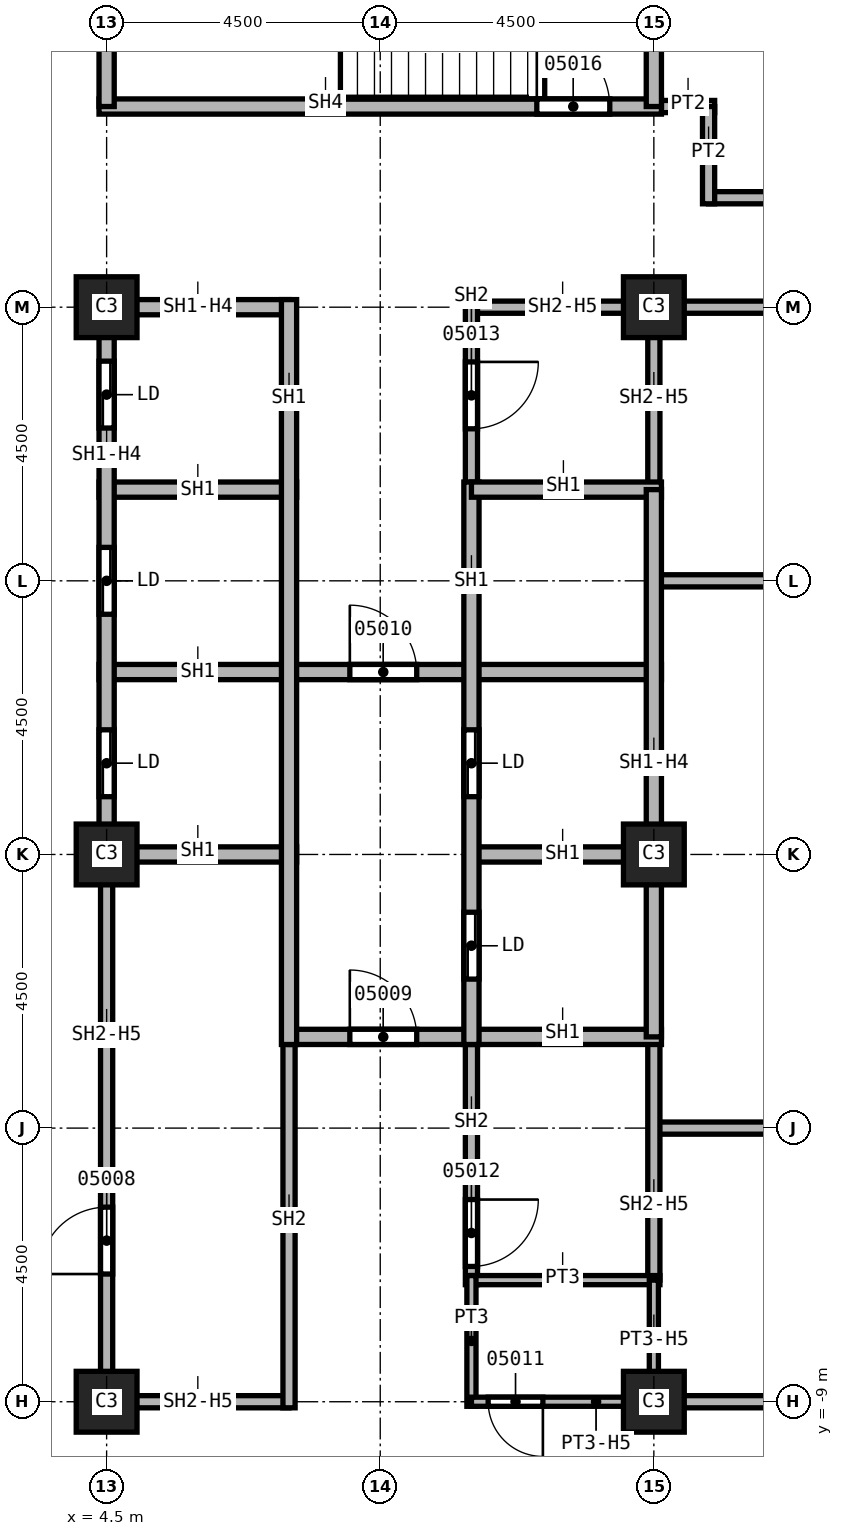
"""IFC4 building model, lengths in metres.
Left out: names, types, materials, properties, quantities, classifications, styles, units other than length and angle.
Written with IfcOpenShell. Run it as: python <this file> out.ifc"""

import sys

from ifc_helpers import new_model, si_unit, direction, frame, frame_2d, origin, origin_2d, place, context, subcontext, project, spatial, rectangle, extrude, element, fill, save


model = new_model("IFC4")
c1 = context("Model", 3, precision=1e-05, world=origin(), true_north=direction((0.0, 1.0)))
c2 = subcontext(c1, "Body", "Model", "MODEL_VIEW")
j1 = project(units=[si_unit("LENGTHUNIT", "METRE"), si_unit("PLANEANGLEUNIT", "RADIAN")], contexts=[c1])
p1 = place(None, origin())
s1 = spatial("IfcSite", under=j1, at=p1, CompositionType="ELEMENT")
p2 = place(p1, origin())
s2 = spatial("IfcBuilding", under=s1, at=p2, CompositionType="ELEMENT")
p3 = place(p2, frame((0.0, 0.0, 112.0)))
s3 = spatial("IfcBuildingStorey", under=s2, at=p3, CompositionType="ELEMENT", Elevation=112.0)
for number, where, z_axis, x_axis in (
    (1, (4.5, 0.0, 0.0), (0.0, 0.0, 1.0), (1.0, 0.0, 0.0)),
    (2, (4.5, 9.0, 0.0), (0.0, 0.0, 1.0), (1.0, 0.0, 0.0)),
    (3, (4.5, -9.0, 0.0), (0.0, 0.0, 1.0), (1.0, 0.0, 0.0)),
    (4, (13.5, 0.0, 0.0), (0.0, 0.0, 1.0), (1.0, 0.0, 0.0)),
    (5, (13.5, 9.0, 0.0), (0.0, 0.0, 1.0), (1.0, 0.0, 0.0)),
    (6, (13.5, -9.0, 0.0), (0.0, 0.0, 1.0), (1.0, 0.0, 0.0)),
):
    element("IfcColumn", number, at=place(p3, frame(where, z_axis=z_axis, x_axis=x_axis)), inside=s3, PredefinedType="COLUMN", context=c2, shape_type="SweptSolid", body=[
        extrude(rectangle(XDim=1.0, YDim=1.0, at=origin_2d()), origin(), (0.0, 0.0, 1.0), 3.7),
    ])
p4 = place(p3, frame((13.375, 12.3, 0.0), z_axis=(0.0, 0.0, 1.0), x_axis=(1.0, 0.0, 0.0)))
e7 = element("IfcWall", 7, at=p4, inside=s3, PredefinedType="PARTITIONING", context=c2, shape_type="SweptSolid", body=[
    extrude(rectangle(XDim=1.125, YDim=0.2, at=frame_2d((0.562, 0.0))), origin(), (0.0, 0.0, 1.0), 3.7),
])
for number, where, z_axis, x_axis in (
    (8, (13.5, -9.0, 0.0), (0.0, 0.0, 1.0), (1.0, 0.0, 0.0)),
    (9, (13.5, -4.5, 0.0), (0.0, 0.0, 1.0), (1.0, 0.0, 0.0)),
    (10, (13.5, 4.5, 0.0), (0.0, 0.0, 1.0), (1.0, 0.0, 0.0)),
    (11, (18.0, 9.0, 0.0), (0.0, 0.0, 1.0), (-1.0, 0.0, 0.0)),
):
    element("IfcWall", number, at=place(p3, frame(where, z_axis=z_axis, x_axis=x_axis)), inside=s3, PredefinedType="PARTITIONING", context=c2, shape_type="SweptSolid", body=[
        extrude(rectangle(XDim=4.5, YDim=0.2, at=frame_2d((2.25, 0.0))), origin(), (0.0, 0.0, 1.0), 3.7),
    ])
p5 = place(p3, frame((14.4, 10.8, 0.0), z_axis=(0.0, 0.0, 1.0), x_axis=(1.0, 0.0, 0.0)))
e12 = element("IfcWall", 12, at=p5, inside=s3, PredefinedType="PARTITIONING", context=c2, shape_type="SweptSolid", body=[
    extrude(rectangle(XDim=3.6, YDim=0.2, at=frame_2d((1.8, 0.0))), origin(), (0.0, 0.0, 1.0), 3.7),
])
p6 = place(p3, frame((14.4, 12.3, 0.0), z_axis=(0.0, 0.0, 1.0), x_axis=(0.0, -1.0, 0.0)))
e13 = element("IfcWall", 13, at=p6, inside=s3, PredefinedType="PARTITIONING", context=c2, shape_type="SweptSolid", body=[
    extrude(rectangle(XDim=1.6, YDim=0.2, at=frame_2d((0.8, 0.0))), origin(), (0.0, 0.0, 1.0), 3.7),
])
p7 = place(p3, frame((4.5, -9.1, 0.0), z_axis=(0.0, 0.0, 1.0), x_axis=(0.0, 1.0, 0.0)))
e14 = element("IfcWall", 14, at=p7, inside=s3, PredefinedType="SOLIDWALL", context=c2, shape_type="SweptSolid", body=[
    extrude(rectangle(XDim=9.1, YDim=0.2, at=frame_2d((4.55, 0.0))), origin(), (0.0, 0.0, 1.0), 2.938),
])
p8 = place(p7, frame((2.2, 0.0, 0.0)))
e15 = element("IfcOpeningElement", 15, at=p8, cuts=e14, PredefinedType="OPENING", context=c2, shape_type="SweptSolid", body=[
    extrude(rectangle(XDim=1.1, YDim=2.1, at=frame_2d((0.55, 1.05))), frame((0.0, 0.1, 0.0), z_axis=(0.0, -1.0, 0.0), x_axis=(1.0, 0.0, 0.0)), (0.0, 0.0, 1.0), 0.2),
])
p9 = place(p3, frame((7.5, -9.0, 0.0), z_axis=(0.0, 0.0, 1.0), x_axis=(-1.0, 0.0, 0.0)))
e16 = element("IfcWall", 16, at=p9, inside=s3, PredefinedType="SOLIDWALL", context=c2, shape_type="SweptSolid", body=[
    extrude(rectangle(XDim=3.0, YDim=0.2, at=frame_2d((1.5, 0.0))), origin(), (0.0, 0.0, 1.0), 2.938),
])
p10 = place(p3, frame((7.5, -2.875, 0.0), z_axis=(0.0, 0.0, 1.0), x_axis=(0.0, -1.0, 0.0)))
e17 = element("IfcWall", 17, at=p10, inside=s3, PredefinedType="SOLIDWALL", context=c2, shape_type="SweptSolid", body=[
    extrude(rectangle(XDim=6.225, YDim=0.2, at=frame_2d((3.113, 0.0))), origin(), (0.0, 0.0, 1.0), 3.7),
])
p11 = place(p3, frame((10.5, -2.875, 0.0), z_axis=(0.0, 0.0, 1.0), x_axis=(0.0, -1.0, 0.0)))
e18 = element("IfcWall", 18, at=p11, inside=s3, PredefinedType="SOLIDWALL", context=c2, shape_type="SweptSolid", body=[
    extrude(rectangle(XDim=4.2, YDim=0.2, at=frame_2d((2.1, 0.0))), origin(), (0.0, 0.0, 1.0), 3.7),
])
p12 = place(p11, frame((2.8, 0.0, 0.0)))
e19 = element("IfcOpeningElement", 19, at=p12, cuts=e18, PredefinedType="OPENING", context=c2, shape_type="SweptSolid", body=[
    extrude(rectangle(XDim=1.1, YDim=2.1, at=frame_2d((0.55, 1.05))), frame((0.0, 0.1, 0.0), z_axis=(0.0, -1.0, 0.0), x_axis=(1.0, 0.0, 0.0)), (0.0, 0.0, 1.0), 0.2),
])
p13 = place(p3, frame((10.5, 9.0, 0.0), z_axis=(0.0, 0.0, 1.0), x_axis=(1.0, 0.0, 0.0)))
e20 = element("IfcWall", 20, at=p13, inside=s3, PredefinedType="SOLIDWALL", context=c2, shape_type="SweptSolid", body=[
    extrude(rectangle(XDim=3.1, YDim=0.2, at=frame_2d((1.55, 0.0))), origin(), (0.0, 0.0, 1.0), 2.938),
])
p14 = place(p3, frame((10.5, 9.1, 0.0), z_axis=(0.0, 0.0, 1.0), x_axis=(0.0, -1.0, 0.0)))
e21 = element("IfcWall", 21, at=p14, inside=s3, PredefinedType="SOLIDWALL", context=c2, shape_type="SweptSolid", body=[
    extrude(rectangle(XDim=3.225, YDim=0.2, at=frame_2d((1.613, 0.0))), origin(), (0.0, 0.0, 1.0), 3.7),
])
p15 = place(p14, frame((1.0, 0.0, 0.0)))
e22 = element("IfcOpeningElement", 22, at=p15, cuts=e21, PredefinedType="OPENING", context=c2, shape_type="SweptSolid", body=[
    extrude(rectangle(XDim=1.1, YDim=2.1, at=frame_2d((0.55, 1.05))), frame((0.0, 0.1, 0.0), z_axis=(0.0, -1.0, 0.0), x_axis=(1.0, 0.0, 0.0)), (0.0, 0.0, 1.0), 0.2),
])
p16 = place(p3, frame((13.5, -3.0, 0.0), z_axis=(0.0, 0.0, 1.0), x_axis=(0.0, -1.0, 0.0)))
e23 = element("IfcWall", 23, at=p16, inside=s3, PredefinedType="SOLIDWALL", context=c2, shape_type="SweptSolid", body=[
    extrude(rectangle(XDim=4.0, YDim=0.2, at=frame_2d((2.0, 0.0))), origin(), (0.0, 0.0, 1.0), 2.938),
])
p17 = place(p3, frame((13.5, 9.1, 0.0), z_axis=(0.0, 0.0, 1.0), x_axis=(0.0, -1.0, 0.0)))
e24 = element("IfcWall", 24, at=p17, inside=s3, PredefinedType="SOLIDWALL", context=c2, shape_type="SweptSolid", body=[
    extrude(rectangle(XDim=3.1, YDim=0.2, at=frame_2d((1.55, 0.0))), origin(), (0.0, 0.0, 1.0), 2.938),
])
p18 = place(p3, frame((4.375, 0.0, 0.0), z_axis=(0.0, 0.0, 1.0), x_axis=(1.0, 0.0, 0.0)))
e25 = element("IfcWall", 25, at=p18, inside=s3, PredefinedType="SOLIDWALL", context=c2, shape_type="SweptSolid", body=[
    extrude(rectangle(XDim=3.25, YDim=0.25, at=frame_2d((1.625, 0.0))), origin(), (0.0, 0.0, 1.0), 3.7),
])
p19 = place(p3, frame((4.375, 3.0, 0.0), z_axis=(0.0, 0.0, 1.0), x_axis=(1.0, 0.0, 0.0)))
e26 = element("IfcWall", 26, at=p19, inside=s3, PredefinedType="SOLIDWALL", context=c2, shape_type="SweptSolid", body=[
    extrude(rectangle(XDim=9.25, YDim=0.25, at=frame_2d((4.625, 0.0))), origin(), (0.0, 0.0, 1.0), 3.7),
])
p20 = place(p19, frame((4.125, 0.0, 0.0)))
e27 = element("IfcOpeningElement", 27, at=p20, cuts=e26, PredefinedType="OPENING", context=c2, shape_type="SweptSolid", body=[
    extrude(rectangle(XDim=1.1, YDim=2.1, at=frame_2d((0.55, 1.05))), frame((0.0, 0.125, 0.0), z_axis=(0.0, -1.0, 0.0), x_axis=(1.0, 0.0, 0.0)), (0.0, 0.0, 1.0), 0.25),
])
p21 = place(p3, frame((4.375, 6.0, 0.0), z_axis=(0.0, 0.0, 1.0), x_axis=(1.0, 0.0, 0.0)))
e28 = element("IfcWall", 28, at=p21, inside=s3, PredefinedType="SOLIDWALL", context=c2, shape_type="SweptSolid", body=[
    extrude(rectangle(XDim=3.25, YDim=0.25, at=frame_2d((1.625, 0.0))), origin(), (0.0, 0.0, 1.0), 3.7),
])
p22 = place(p3, frame((4.5, 0.0, 0.0), z_axis=(0.0, 0.0, 1.0), x_axis=(0.0, 1.0, 0.0)))
e29 = element("IfcWall", 29, at=p22, inside=s3, PredefinedType="SOLIDWALL", context=c2, shape_type="SweptSolid", body=[
    extrude(rectangle(XDim=9.125, YDim=0.25, at=frame_2d((4.562, 0.0))), origin(), (0.0, 0.0, 1.0), 2.938),
])
p23 = place(p22, frame((0.95, 0.0, 0.0)))
e30 = element("IfcOpeningElement", 30, at=p23, cuts=e29, PredefinedType="OPENING", context=c2, shape_type="SweptSolid", body=[
    extrude(rectangle(XDim=1.1, YDim=2.1, at=frame_2d((0.55, 1.05))), frame((0.0, 0.125, 0.0), z_axis=(0.0, -1.0, 0.0), x_axis=(1.0, 0.0, 0.0)), (0.0, 0.0, 1.0), 0.25),
])
p24 = place(p22, frame((3.95, 0.0, 0.0)))
e31 = element("IfcOpeningElement", 31, at=p24, cuts=e29, PredefinedType="OPENING", context=c2, shape_type="SweptSolid", body=[
    extrude(rectangle(XDim=1.1, YDim=2.1, at=frame_2d((0.55, 1.05))), frame((0.0, 0.125, 0.0), z_axis=(0.0, -1.0, 0.0), x_axis=(1.0, 0.0, 0.0)), (0.0, 0.0, 1.0), 0.25),
])
p25 = place(p22, frame((7.012, 0.0, 0.0)))
e32 = element("IfcOpeningElement", 32, at=p25, cuts=e29, PredefinedType="OPENING", context=c2, shape_type="SweptSolid", body=[
    extrude(rectangle(XDim=1.1, YDim=2.1, at=frame_2d((0.55, 1.05))), frame((0.0, 0.125, 0.0), z_axis=(0.0, -1.0, 0.0), x_axis=(1.0, 0.0, 0.0)), (0.0, 0.0, 1.0), 0.25),
])
p26 = place(p3, frame((4.5, 9.0, 0.0), z_axis=(0.0, 0.0, 1.0), x_axis=(1.0, 0.0, 0.0)))
e33 = element("IfcWall", 33, at=p26, inside=s3, PredefinedType="SOLIDWALL", context=c2, shape_type="SweptSolid", body=[
    extrude(rectangle(XDim=3.0, YDim=0.25, at=frame_2d((1.5, 0.0))), origin(), (0.0, 0.0, 1.0), 2.938),
])
p27 = place(p3, frame((7.5, -3.0, 0.0), z_axis=(0.0, 0.0, 1.0), x_axis=(1.0, 0.0, 0.0)))
e34 = element("IfcWall", 34, at=p27, inside=s3, PredefinedType="SOLIDWALL", context=c2, shape_type="SweptSolid", body=[
    extrude(rectangle(XDim=6.125, YDim=0.25, at=frame_2d((3.062, 0.0))), origin(), (0.0, 0.0, 1.0), 3.7),
])
p28 = place(p27, frame((1.0, 0.0, 0.0)))
e35 = element("IfcOpeningElement", 35, at=p28, cuts=e34, PredefinedType="OPENING", context=c2, shape_type="SweptSolid", body=[
    extrude(rectangle(XDim=1.1, YDim=2.1, at=frame_2d((0.55, 1.05))), frame((0.0, 0.125, 0.0), z_axis=(0.0, -1.0, 0.0), x_axis=(1.0, 0.0, 0.0)), (0.0, 0.0, 1.0), 0.25),
])
p29 = place(p3, frame((7.5, 9.125, 0.0), z_axis=(0.0, 0.0, 1.0), x_axis=(0.0, -1.0, 0.0)))
e36 = element("IfcWall", 36, at=p29, inside=s3, PredefinedType="SOLIDWALL", context=c2, shape_type="SweptSolid", body=[
    extrude(rectangle(XDim=12.25, YDim=0.25, at=frame_2d((6.125, 0.0))), origin(), (0.0, 0.0, 1.0), 3.7),
])
p30 = place(p3, frame((10.5, 0.0, 0.0), z_axis=(0.0, 0.0, 1.0), x_axis=(1.0, 0.0, 0.0)))
e37 = element("IfcWall", 37, at=p30, inside=s3, PredefinedType="SOLIDWALL", context=c2, shape_type="SweptSolid", body=[
    extrude(rectangle(XDim=3.125, YDim=0.25, at=frame_2d((1.562, 0.0))), origin(), (0.0, 0.0, 1.0), 3.7),
])
p31 = place(p3, frame((10.5, 6.125, 0.0), z_axis=(0.0, 0.0, 1.0), x_axis=(0.0, -1.0, 0.0)))
e38 = element("IfcWall", 38, at=p31, inside=s3, PredefinedType="SOLIDWALL", context=c2, shape_type="SweptSolid", body=[
    extrude(rectangle(XDim=9.25, YDim=0.25, at=frame_2d((4.625, 0.0))), origin(), (0.0, 0.0, 1.0), 3.7),
])
p32 = place(p31, frame((7.075, 0.0, 0.0)))
e39 = element("IfcOpeningElement", 39, at=p32, cuts=e38, PredefinedType="OPENING", context=c2, shape_type="SweptSolid", body=[
    extrude(rectangle(XDim=1.1, YDim=2.1, at=frame_2d((0.55, 1.05))), frame((0.0, 0.125, 0.0), z_axis=(0.0, -1.0, 0.0), x_axis=(1.0, 0.0, 0.0)), (0.0, 0.0, 1.0), 0.25),
])
p33 = place(p31, frame((4.075, 0.0, 0.0)))
e40 = element("IfcOpeningElement", 40, at=p33, cuts=e38, PredefinedType="OPENING", context=c2, shape_type="SweptSolid", body=[
    extrude(rectangle(XDim=1.1, YDim=2.1, at=frame_2d((0.55, 1.05))), frame((0.0, 0.125, 0.0), z_axis=(0.0, -1.0, 0.0), x_axis=(1.0, 0.0, 0.0)), (0.0, 0.0, 1.0), 0.25),
])
p34 = place(p3, frame((10.5, 6.0, 0.0), z_axis=(0.0, 0.0, 1.0), x_axis=(1.0, 0.0, 0.0)))
e41 = element("IfcWall", 41, at=p34, inside=s3, PredefinedType="SOLIDWALL", context=c2, shape_type="SweptSolid", body=[
    extrude(rectangle(XDim=3.125, YDim=0.25, at=frame_2d((1.562, 0.0))), origin(), (0.0, 0.0, 1.0), 3.7),
])
p35 = place(p3, frame((13.5, 6.0, 0.0), z_axis=(0.0, 0.0, 1.0), x_axis=(0.0, -1.0, 0.0)))
e42 = element("IfcWall", 42, at=p35, inside=s3, PredefinedType="SOLIDWALL", context=c2, shape_type="SweptSolid", body=[
    extrude(rectangle(XDim=9.0, YDim=0.25, at=frame_2d((4.5, 0.0))), origin(), (0.0, 0.0, 1.0), 2.938),
])
p36 = place(p3, frame((4.375, 12.3, 0.0), z_axis=(0.0, 0.0, 1.0), x_axis=(1.0, 0.0, 0.0)))
e43 = element("IfcWall", 43, at=p36, inside=s3, PredefinedType="SOLIDWALL", context=c2, shape_type="SweptSolid", body=[
    extrude(rectangle(XDim=9.25, YDim=0.25, at=frame_2d((4.625, 0.0))), origin(), (0.0, 0.0, 1.0), 3.7),
])
p37 = place(p36, frame((7.2, 0.0, 0.0)))
e44 = element("IfcOpeningElement", 44, at=p37, cuts=e43, PredefinedType="OPENING", context=c2, shape_type="SweptSolid", body=[
    extrude(rectangle(XDim=1.2, YDim=2.1, at=frame_2d((0.6, 1.05))), frame((0.0, 0.125, 0.0), z_axis=(0.0, -1.0, 0.0), x_axis=(1.0, 0.0, 0.0)), (0.0, 0.0, 1.0), 0.25),
])
for number, where, z_axis, x_axis in (
    (45, (4.5, 12.3, 0.0), (0.0, 0.0, 1.0), (0.0, 1.0, 0.0)),
    (46, (13.5, 16.8, 0.0), (0.0, 0.0, 1.0), (0.0, -1.0, 0.0)),
):
    element("IfcWall", number, at=place(p3, frame(where, z_axis=z_axis, x_axis=x_axis)), inside=s3, PredefinedType="SOLIDWALL", context=c2, shape_type="SweptSolid", body=[
        extrude(rectangle(XDim=4.5, YDim=0.25, at=frame_2d((2.25, 0.0))), origin(), (0.0, 0.0, 1.0), 3.7),
    ])
p38 = place(p3, frame((10.5, -7.0, 0.0), z_axis=(0.0, 0.0, 1.0), x_axis=(1.0, 0.0, 0.0)))
e47 = element("IfcWall", 47, at=p38, inside=s3, PredefinedType="PARTITIONING", context=c2, shape_type="SweptSolid", body=[
    extrude(rectangle(XDim=3.1, YDim=0.15, at=frame_2d((1.55, 0.0))), origin(), (0.0, 0.0, 1.0), 3.7),
])
p39 = place(p3, frame((10.5, -6.925, 0.0), z_axis=(0.0, 0.0, 1.0), x_axis=(0.0, -1.0, 0.0)))
e48 = element("IfcWall", 48, at=p39, inside=s3, PredefinedType="PARTITIONING", context=c2, shape_type="SweptSolid", body=[
    extrude(rectangle(XDim=2.15, YDim=0.15, at=frame_2d((1.075, 0.0))), origin(), (0.0, 0.0, 1.0), 3.7),
])
p40 = place(p3, frame((13.5, -7.0, 0.0), z_axis=(0.0, 0.0, 1.0), x_axis=(0.0, -1.0, 0.0)))
e49 = element("IfcWall", 49, at=p40, inside=s3, PredefinedType="PARTITIONING", context=c2, shape_type="SweptSolid", body=[
    extrude(rectangle(XDim=2.1, YDim=0.15, at=frame_2d((1.05, 0.0))), origin(), (0.0, 0.0, 1.0), 2.938),
])
p41 = place(p3, frame((13.575, -9.0, 0.0), z_axis=(0.0, 0.0, 1.0), x_axis=(-1.0, 0.0, 0.0)))
e50 = element("IfcWall", 50, at=p41, inside=s3, PredefinedType="PARTITIONING", context=c2, shape_type="SweptSolid", body=[
    extrude(rectangle(XDim=3.075, YDim=0.15, at=frame_2d((1.538, 0.0))), origin(), (0.0, 0.0, 1.0), 2.938),
])
p42 = place(p41, frame((1.9, 0.0, 0.0)))
e51 = element("IfcOpeningElement", 51, at=p42, cuts=e50, PredefinedType="OPENING", context=c2, shape_type="SweptSolid", body=[
    extrude(rectangle(XDim=0.9, YDim=2.1, at=frame_2d((0.45, 1.05))), frame((0.0, 0.075, 0.0), z_axis=(0.0, -1.0, 0.0), x_axis=(1.0, 0.0, 0.0)), (0.0, 0.0, 1.0), 0.15),
])
p43 = place(p8, origin())
e52 = element("IfcDoor", 52, at=p43, inside=s3, OperationType="SINGLE_SWING_LEFT", PredefinedType="DOOR", context=c2, shape_type="SweptSolid", body=[
    extrude(rectangle(XDim=1.1, YDim=2.1, at=frame_2d((0.55, 1.05))), frame((0.0, 0.025, 0.0), z_axis=(0.0, -1.0, 0.0), x_axis=(1.0, 0.0, 0.0)), (0.0, 0.0, 1.0), 0.05),
])
fill(e15, e52)
p44 = place(p28, origin())
e53 = element("IfcDoor", 53, at=p44, inside=s3, OperationType="SINGLE_SWING_RIGHT", PredefinedType="DOOR", context=c2, shape_type="SweptSolid", body=[
    extrude(rectangle(XDim=1.1, YDim=2.1, at=frame_2d((0.55, 1.05))), frame((0.0, 0.025, 0.0), z_axis=(0.0, -1.0, 0.0), x_axis=(1.0, 0.0, 0.0)), (0.0, 0.0, 1.0), 0.05),
])
fill(e35, e53)
p45 = place(p20, origin())
e54 = element("IfcDoor", 54, at=p45, inside=s3, OperationType="SINGLE_SWING_LEFT", PredefinedType="DOOR", context=c2, shape_type="SweptSolid", body=[
    extrude(rectangle(XDim=1.1, YDim=2.1, at=frame_2d((0.55, 1.05))), frame((0.0, 0.025, 0.0), z_axis=(0.0, -1.0, 0.0), x_axis=(1.0, 0.0, 0.0)), (0.0, 0.0, 1.0), 0.05),
])
fill(e27, e54)
p46 = place(p42, origin())
e55 = element("IfcDoor", 55, at=p46, inside=s3, OperationType="SINGLE_SWING_RIGHT", PredefinedType="DOOR", context=c2, shape_type="SweptSolid", body=[
    extrude(rectangle(XDim=0.9, YDim=2.1, at=frame_2d((0.45, 1.05))), frame((0.0, 0.025, 0.0), z_axis=(0.0, -1.0, 0.0), x_axis=(1.0, 0.0, 0.0)), (0.0, 0.0, 1.0), 0.05),
])
fill(e51, e55)
p47 = place(p12, origin())
e56 = element("IfcDoor", 56, at=p47, inside=s3, OperationType="SINGLE_SWING_LEFT", PredefinedType="DOOR", context=c2, shape_type="SweptSolid", body=[
    extrude(rectangle(XDim=1.1, YDim=2.1, at=frame_2d((0.55, 1.05))), frame((0.0, 0.025, 0.0), z_axis=(0.0, -1.0, 0.0), x_axis=(1.0, 0.0, 0.0)), (0.0, 0.0, 1.0), 0.05),
])
fill(e19, e56)
p48 = place(p15, origin())
e57 = element("IfcDoor", 57, at=p48, inside=s3, OperationType="SINGLE_SWING_RIGHT", PredefinedType="DOOR", context=c2, shape_type="SweptSolid", body=[
    extrude(rectangle(XDim=1.1, YDim=2.1, at=frame_2d((0.55, 1.05))), frame((0.0, 0.025, 0.0), z_axis=(0.0, -1.0, 0.0), x_axis=(1.0, 0.0, 0.0)), (0.0, 0.0, 1.0), 0.05),
])
fill(e22, e57)
p49 = place(p37, origin())
e58 = element("IfcDoor", 58, at=p49, inside=s3, OperationType="SINGLE_SWING_LEFT", PredefinedType="DOOR", context=c2, shape_type="SweptSolid", body=[
    extrude(rectangle(XDim=1.2, YDim=2.1, at=frame_2d((0.6, 1.05))), frame((0.0, 0.025, 0.0), z_axis=(0.0, -1.0, 0.0), x_axis=(1.0, 0.0, 0.0)), (0.0, 0.0, 1.0), 0.05),
])
fill(e44, e58)
p50 = place(p23, origin())
e59 = element("IfcDoor", 59, at=p50, inside=s3, OperationType="SLIDING_TO_LEFT", PredefinedType="DOOR", context=c2, shape_type="SweptSolid", body=[
    extrude(rectangle(XDim=1.1, YDim=2.1, at=frame_2d((0.55, 1.05))), frame((0.0, 0.025, 0.0), z_axis=(0.0, -1.0, 0.0), x_axis=(1.0, 0.0, 0.0)), (0.0, 0.0, 1.0), 0.05),
])
fill(e30, e59)
p51 = place(p24, origin())
e60 = element("IfcDoor", 60, at=p51, inside=s3, OperationType="SLIDING_TO_LEFT", PredefinedType="DOOR", context=c2, shape_type="SweptSolid", body=[
    extrude(rectangle(XDim=1.1, YDim=2.1, at=frame_2d((0.55, 1.05))), frame((0.0, 0.025, 0.0), z_axis=(0.0, -1.0, 0.0), x_axis=(1.0, 0.0, 0.0)), (0.0, 0.0, 1.0), 0.05),
])
fill(e31, e60)
p52 = place(p25, origin())
e61 = element("IfcDoor", 61, at=p52, inside=s3, OperationType="SLIDING_TO_LEFT", PredefinedType="DOOR", context=c2, shape_type="SweptSolid", body=[
    extrude(rectangle(XDim=1.1, YDim=2.1, at=frame_2d((0.55, 1.05))), frame((0.0, 0.025, 0.0), z_axis=(0.0, -1.0, 0.0), x_axis=(1.0, 0.0, 0.0)), (0.0, 0.0, 1.0), 0.05),
])
fill(e32, e61)
p53 = place(p32, origin())
e62 = element("IfcDoor", 62, at=p53, inside=s3, OperationType="SLIDING_TO_LEFT", PredefinedType="DOOR", context=c2, shape_type="SweptSolid", body=[
    extrude(rectangle(XDim=1.1, YDim=2.1, at=frame_2d((0.55, 1.05))), frame((0.0, 0.025, 0.0), z_axis=(0.0, -1.0, 0.0), x_axis=(1.0, 0.0, 0.0)), (0.0, 0.0, 1.0), 0.05),
])
fill(e39, e62)
p54 = place(p33, origin())
e63 = element("IfcDoor", 63, at=p54, inside=s3, OperationType="SLIDING_TO_LEFT", PredefinedType="DOOR", context=c2, shape_type="SweptSolid", body=[
    extrude(rectangle(XDim=1.1, YDim=2.1, at=frame_2d((0.55, 1.05))), frame((0.0, 0.025, 0.0), z_axis=(0.0, -1.0, 0.0), x_axis=(1.0, 0.0, 0.0)), (0.0, 0.0, 1.0), 0.05),
])
fill(e40, e63)
save(model, sys.argv[1])
